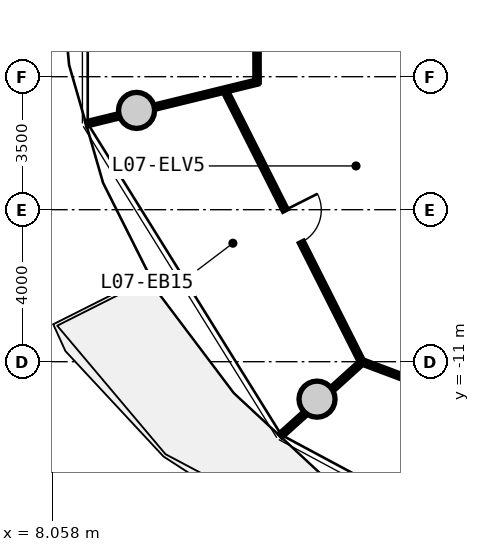
"""IFC4 building model, lengths in metres.
Left out: names, types, materials, properties, quantities, classifications, styles, units other than length and angle.
Written with IfcOpenShell. Run it as: python <this file> out.ifc"""

import sys

from ifc_helpers import new_model, si_unit, direction, frame, frame_2d, origin, origin_2d, place, context, subcontext, project, spatial, rectangle, circle, extrude, source, transform, mapped, element, fill, save


model = new_model("IFC4")
c1 = context("Model", 3, precision=1e-05, world=origin(), true_north=direction((0.0, 1.0)))
c2 = subcontext(c1, "Body", "Model", "MODEL_VIEW")
j1 = project(units=[si_unit("LENGTHUNIT", "METRE"), si_unit("PLANEANGLEUNIT", "RADIAN")], contexts=[c1])
p1 = place(None, origin())
s1 = spatial("IfcSite", under=j1, at=p1, CompositionType="ELEMENT")
p2 = place(p1, origin())
s2 = spatial("IfcBuilding", under=s1, at=p2, CompositionType="ELEMENT")
p3 = place(p2, frame((0.0, 0.0, 27.7)))
s3 = spatial("IfcBuildingStorey", under=s2, at=p3, CompositionType="ELEMENT", Elevation=27.7)
m1 = source(origin(), c2, "Body", "SweptSolid", [
    extrude(circle(Radius=0.475, at=origin_2d()), origin(), (0.0, 0.0, 1.0), 3.05),
])
for number, where, z_axis, x_axis in (
    (1, (10.275, -4.387, 0.0), (0.0, 0.0, 1.0), (1.0, 0.0, 0.0)),
    (2, (15.025, -11.985, 0.0), (0.0, 0.0, 1.0), (1.0, 0.0, 0.0)),
):
    element("IfcColumn", number, at=place(p3, frame(where, z_axis=z_axis, x_axis=x_axis)), inside=s3, PredefinedType="COLUMN", context=c2, shape_type="MappedRepresentation", body=[
        mapped(m1, transform((0.0, 0.0, 0.0), x_axis=(1.0, 0.0, 0.0), y_axis=(0.0, 1.0, 0.0), z_axis=(0.0, 0.0, 1.0), scale=1.0)),
    ])
m2 = source(origin(), c2, "Body", "SweptSolid", [
    extrude(rectangle(XDim=8.018, YDim=0.115, at=frame_2d((4.009, 0.0))), origin(), (0.0, 0.0, 1.0), 2.775),
])
p4 = place(p3, frame((12.596, -3.854, 0.0), z_axis=(0.0, 0.0, 1.0), x_axis=(0.450134355233, -0.89296084026, 0.0)))
e3 = element("IfcWall", 3, at=p4, inside=s3, PredefinedType="PARTITIONING", context=c2, shape_type="MappedRepresentation", body=[
    mapped(m2, transform((0.0, 0.0, 0.0), x_axis=(1.0, 0.0, 0.0), y_axis=(0.0, 1.0, 0.0), z_axis=(0.0, 0.0, 1.0), scale=1.0)),
])
p5 = place(p4, frame((3.534, 0.0, 0.0)))
e4 = element("IfcOpeningElement", 4, at=p5, cuts=e3, PredefinedType="OPENING", context=c2, shape_type="SweptSolid", body=[
    extrude(rectangle(XDim=0.95, YDim=2.1, at=frame_2d((0.475, 1.05))), frame((0.0, 0.067, 0.0), z_axis=(0.0, -1.0, 0.0), x_axis=(1.0, 0.0, 0.0)), (0.0, 0.0, 1.0), 0.135),
])
m3 = source(origin(), c2, "Body", "SweptSolid", [
    extrude(rectangle(XDim=4.609, YDim=0.115, at=frame_2d((2.305, 0.0))), origin(), (0.0, 0.0, 1.0), 2.225),
])
p6 = place(p3, frame((13.448, -3.641, 0.0), z_axis=(0.0, 0.0, 1.0), x_axis=(-0.971345494518, -0.237671896276, 0.0)))
e5 = element("IfcWall", 5, at=p6, inside=s3, PredefinedType="PARTITIONING", context=c2, shape_type="MappedRepresentation", body=[
    mapped(m3, transform((0.0, 0.0, 0.0), x_axis=(1.0, 0.0, 0.0), y_axis=(0.0, 1.0, 0.0), z_axis=(0.0, 0.0, 1.0), scale=1.0)),
])
m4 = source(origin(), c2, "Body", "SweptSolid", [
    extrude(rectangle(XDim=8.32, YDim=0.115, at=frame_2d((4.16, 0.0))), origin(), (0.0, 0.0, 1.0), 2.775),
])
p7 = place(p3, frame((16.214, -11.006, 0.0), z_axis=(0.0, 0.0, 1.0), x_axis=(0.936180763098, -0.351518959382, 0.0)))
e6 = element("IfcWall", 6, at=p7, inside=s3, PredefinedType="PARTITIONING", context=c2, shape_type="MappedRepresentation", body=[
    mapped(m4, transform((0.0, 0.0, 0.0), x_axis=(1.0, 0.0, 0.0), y_axis=(0.0, 1.0, 0.0), z_axis=(0.0, 0.0, 1.0), scale=1.0)),
])
p8 = place(p7, frame((3.685, 0.0, 0.0)))
e7 = element("IfcOpeningElement", 7, at=p8, cuts=e6, PredefinedType="OPENING", context=c2, shape_type="SweptSolid", body=[
    extrude(rectangle(XDim=0.95, YDim=2.1, at=frame_2d((0.475, 1.05))), frame((0.0, 0.067, 0.0), z_axis=(0.0, -1.0, 0.0), x_axis=(1.0, 0.0, 0.0)), (0.0, 0.0, 1.0), 0.135),
])
m5 = source(origin(), c2, "Body", "SweptSolid", [
    extrude(rectangle(XDim=2.887, YDim=0.115, at=frame_2d((1.444, 0.0))), origin(), (0.0, 0.0, 1.0), 2.225),
])
p9 = place(p3, frame((16.214, -11.006, 0.0), z_axis=(0.0, 0.0, 1.0), x_axis=(-0.742448503307, -0.669903142205, 0.0)))
e8 = element("IfcWall", 8, at=p9, inside=s3, PredefinedType="PARTITIONING", context=c2, shape_type="MappedRepresentation", body=[
    mapped(m5, transform((0.0, 0.0, 0.0), x_axis=(1.0, 0.0, 0.0), y_axis=(0.0, 1.0, 0.0), z_axis=(0.0, 0.0, 1.0), scale=1.0)),
])
m6 = source(origin(), c2, "Body", "SweptSolid", [
    extrude(rectangle(XDim=3.641, YDim=0.115, at=frame_2d((1.821, 0.0))), origin(), (0.0, 0.0, 1.0), 2.775),
])
p10 = place(p3, frame((13.44, 0.0, 0.0), z_axis=(0.0, 0.0, 1.0), x_axis=(0.001877301419, -0.999998237868, 0.0)))
e9 = element("IfcWall", 9, at=p10, inside=s3, PredefinedType="PARTITIONING", context=c2, shape_type="MappedRepresentation", body=[
    mapped(m6, transform((0.0, 0.0, 0.0), x_axis=(1.0, 0.0, 0.0), y_axis=(0.0, 1.0, 0.0), z_axis=(0.0, 0.0, 1.0), scale=1.0)),
])
m7 = source(origin(), c2, "Body", "SweptSolid", [
    extrude(rectangle(XDim=0.95, YDim=2.1, at=frame_2d((0.475, 1.05))), frame((0.0, 0.025, 0.0), z_axis=(0.0, -1.0, 0.0), x_axis=(1.0, 0.0, 0.0)), (0.0, 0.0, 1.0), 0.05),
])
p11 = place(p5, origin())
e10 = element("IfcDoor", 10, at=p11, inside=s3, OperationType="SINGLE_SWING_LEFT", PredefinedType="DOOR", context=c2, shape_type="MappedRepresentation", body=[
    mapped(m7, transform((0.0, 0.0, 0.0), x_axis=(1.0, 0.0, 0.0), y_axis=(0.0, 1.0, 0.0), z_axis=(0.0, 0.0, 1.0), scale=1.0)),
])
fill(e4, e10)
save(model, sys.argv[1])
